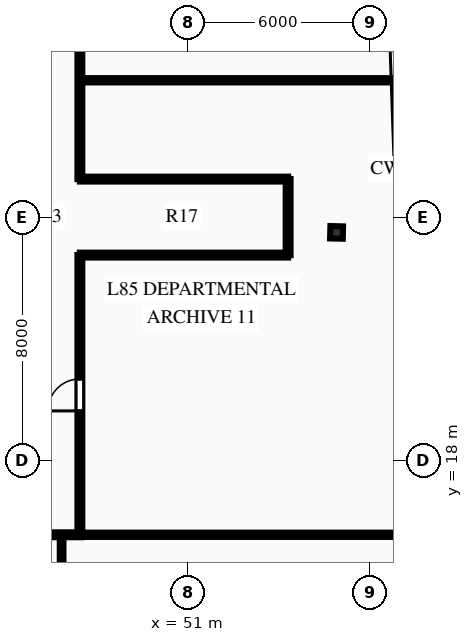
"""IFC4 building model, lengths in metres.
Left out: names, types, materials, properties, quantities, classifications, styles, units other than length and angle.
Written with IfcOpenShell. Run it as: python <this file> out.ifc"""

import sys

from ifc_helpers import new_model, si_unit, direction, frame, frame_2d, origin, origin_2d, place, context, subcontext, project, spatial, rectangle, i_section, extrude, element, fill, save


model = new_model("IFC4")
c1 = context("Model", 3, precision=1e-05, world=origin(), true_north=direction((0.0, 1.0)))
c2 = subcontext(c1, "Body", "Model", "MODEL_VIEW")
j1 = project(units=[si_unit("LENGTHUNIT", "METRE"), si_unit("PLANEANGLEUNIT", "RADIAN")], contexts=[c1])
p1 = place(None, origin())
s1 = spatial("IfcSite", under=j1, at=p1, CompositionType="ELEMENT")
p2 = place(p1, origin())
s2 = spatial("IfcBuilding", under=s1, at=p2, CompositionType="ELEMENT")
p3 = place(p2, frame((0.0, 0.0, 336.45)))
s3 = spatial("IfcBuildingStorey", under=s2, at=p3, CompositionType="ELEMENT", Elevation=336.45)
p4 = place(p3, frame((55.894, 25.496, 0.0), z_axis=(0.0, 0.0, 1.0), x_axis=(0.025304572866, 0.999679788028, 0.0)))
e1 = element("IfcColumn", 1, at=p4, inside=s3, PredefinedType="COLUMN", context=c2, shape_type="SweptSolid", body=[
    extrude(i_section(OverallWidth=0.406, OverallDepth=0.416, WebThickness=0.03, FlangeThickness=0.048, at=origin_2d()), origin(), (0.0, 0.0, 1.0), 3.75),
])
p5 = place(p3, frame((37.25, 15.55, 0.0), z_axis=(0.0, 0.0, 1.0), x_axis=(1.0, 0.0, 0.0)))
e2 = element("IfcWall", 2, at=p5, inside=s3, PredefinedType="PARTITIONING", context=c2, shape_type="SweptSolid", body=[
    extrude(rectangle(XDim=10.25, YDim=0.16, at=frame_2d((5.125, 0.0))), origin(), (0.0, 0.0, 1.0), 3.49),
])
p6 = place(p5, frame((3.4, 0.0, 0.0)))
e3 = element("IfcOpeningElement", 3, at=p6, cuts=e2, PredefinedType="OPENING", context=c2, shape_type="SweptSolid", body=[
    extrude(rectangle(XDim=0.9, YDim=2.15, at=frame_2d((0.45, 1.075))), frame((0.0, 0.09, 0.0), z_axis=(0.0, -1.0, 0.0), x_axis=(1.0, 0.0, 0.0)), (0.0, 0.0, 1.0), 0.18),
])
p7 = place(p5, frame((5.7, 0.0, 0.0)))
e4 = element("IfcOpeningElement", 4, at=p7, cuts=e2, PredefinedType="OPENING", context=c2, shape_type="SweptSolid", body=[
    extrude(rectangle(XDim=0.9, YDim=2.15, at=frame_2d((0.45, 1.075))), frame((0.0, 0.09, 0.0), z_axis=(0.0, -1.0, 0.0), x_axis=(1.0, 0.0, 0.0)), (0.0, 0.0, 1.0), 0.18),
])
p8 = place(p5, frame((7.95, 0.0, 0.0)))
e5 = element("IfcOpeningElement", 5, at=p8, cuts=e2, PredefinedType="OPENING", context=c2, shape_type="SweptSolid", body=[
    extrude(rectangle(XDim=1.0, YDim=2.15, at=frame_2d((0.5, 1.075))), frame((0.0, 0.09, 0.0), z_axis=(0.0, -1.0, 0.0), x_axis=(1.0, 0.0, 0.0)), (0.0, 0.0, 1.0), 0.18),
])
p9 = place(p3, frame((47.45, 15.55, 0.0), z_axis=(0.0, 0.0, 1.0), x_axis=(0.0, 1.0, 0.0)))
e6 = element("IfcWall", 6, at=p9, inside=s3, PredefinedType="PARTITIONING", context=c2, shape_type="SweptSolid", body=[
    extrude(rectangle(XDim=9.2, YDim=0.16, at=frame_2d((4.6, 0.0))), origin(), (0.0, 0.0, 1.0), 3.49),
])
p10 = place(p9, frame((4.075, 0.0, 0.0)))
e7 = element("IfcOpeningElement", 7, at=p10, cuts=e6, PredefinedType="OPENING", context=c2, shape_type="SweptSolid", body=[
    extrude(rectangle(XDim=1.05, YDim=2.15, at=frame_2d((0.525, 1.075))), frame((0.0, 0.09, 0.0), z_axis=(0.0, -1.0, 0.0), x_axis=(1.0, 0.0, 0.0)), (0.0, 0.0, 1.0), 0.18),
])
p11 = place(p3, frame((47.45, 27.25, 0.0), z_axis=(0.0, 0.0, 1.0), x_axis=(0.0, 1.0, 0.0)))
e8 = element("IfcWall", 8, at=p11, inside=s3, PredefinedType="PARTITIONING", context=c2, shape_type="SweptSolid", body=[
    extrude(rectangle(XDim=9.2, YDim=0.16, at=frame_2d((4.6, 0.0))), origin(), (0.0, 0.0, 1.0), 3.49),
])
p12 = place(p11, frame((4.403, 0.0, 0.0)))
e9 = element("IfcOpeningElement", 9, at=p12, cuts=e8, PredefinedType="OPENING", context=c2, shape_type="SweptSolid", body=[
    extrude(rectangle(XDim=1.05, YDim=2.15, at=frame_2d((0.525, 1.075))), frame((0.0, 0.09, 0.0), z_axis=(0.0, -1.0, 0.0), x_axis=(1.0, 0.0, 0.0)), (0.0, 0.0, 1.0), 0.18),
])
for number, where, z_axis, x_axis in (
    (10, (47.45, 24.75, 0.0), (0.0, 0.0, 1.0), (1.0, 0.0, 0.0)),
    (11, (47.45, 27.25, 0.0), (0.0, 0.0, 1.0), (1.0, 0.0, 0.0)),
):
    element("IfcWall", number, at=place(p3, frame(where, z_axis=z_axis, x_axis=x_axis)), inside=s3, PredefinedType="PARTITIONING", context=c2, shape_type="SweptSolid", body=[
        extrude(rectangle(XDim=6.85, YDim=0.16, at=frame_2d((3.425, 0.0))), origin(), (0.0, 0.0, 1.0), 3.49),
    ])
p13 = place(p3, frame((54.3, 24.75, 0.0), z_axis=(0.0, 0.0, 1.0), x_axis=(0.0, 1.0, 0.0)))
e12 = element("IfcWall", 12, at=p13, inside=s3, PredefinedType="PARTITIONING", context=c2, shape_type="SweptSolid", body=[
    extrude(rectangle(XDim=2.5, YDim=0.16, at=frame_2d((1.25, 0.0))), origin(), (0.0, 0.0, 1.0), 3.49),
])
p14 = place(p3, frame((46.85, 11.65, 0.0), z_axis=(0.0, 0.0, 1.0), x_axis=(0.0, 1.0, 0.0)))
e13 = element("IfcWall", 13, at=p14, inside=s3, PredefinedType="PARTITIONING", context=c2, shape_type="SweptSolid", body=[
    extrude(rectangle(XDim=3.9, YDim=0.12, at=frame_2d((1.95, 0.0))), origin(), (0.0, 0.0, 1.0), 3.49),
])
p15 = place(p3, frame((47.45, 15.55, 0.0), z_axis=(0.0, 0.0, 1.0), x_axis=(1.0, 0.0, 0.0)))
e14 = element("IfcWall", 14, at=p15, inside=s3, PredefinedType="PARTITIONING", context=c2, shape_type="SweptSolid", body=[
    extrude(rectangle(XDim=11.013, YDim=0.14, at=frame_2d((5.507, 0.0))), origin(), (0.0, 0.0, 1.0), 2.868),
])
p16 = place(p3, frame((47.45, 30.5, 0.0), z_axis=(0.0, 0.0, 1.0), x_axis=(1.0, 0.0, 0.0)))
e15 = element("IfcWall", 15, at=p16, inside=s3, PredefinedType="PARTITIONING", context=c2, shape_type="SweptSolid", body=[
    extrude(rectangle(XDim=10.491, YDim=0.14, at=frame_2d((5.246, 0.0))), origin(), (0.0, 0.0, 1.0), 3.49),
])
p17 = place(p10, origin())
e16 = element("IfcDoor", 16, at=p17, inside=s3, OperationType="SINGLE_SWING_LEFT", PredefinedType="DOOR", context=c2, shape_type="SweptSolid", body=[
    extrude(rectangle(XDim=1.05, YDim=2.15, at=frame_2d((0.525, 1.075))), frame((0.0, 0.025, 0.0), z_axis=(0.0, -1.0, 0.0), x_axis=(1.0, 0.0, 0.0)), (0.0, 0.0, 1.0), 0.05),
])
fill(e7, e16)
save(model, sys.argv[1])
